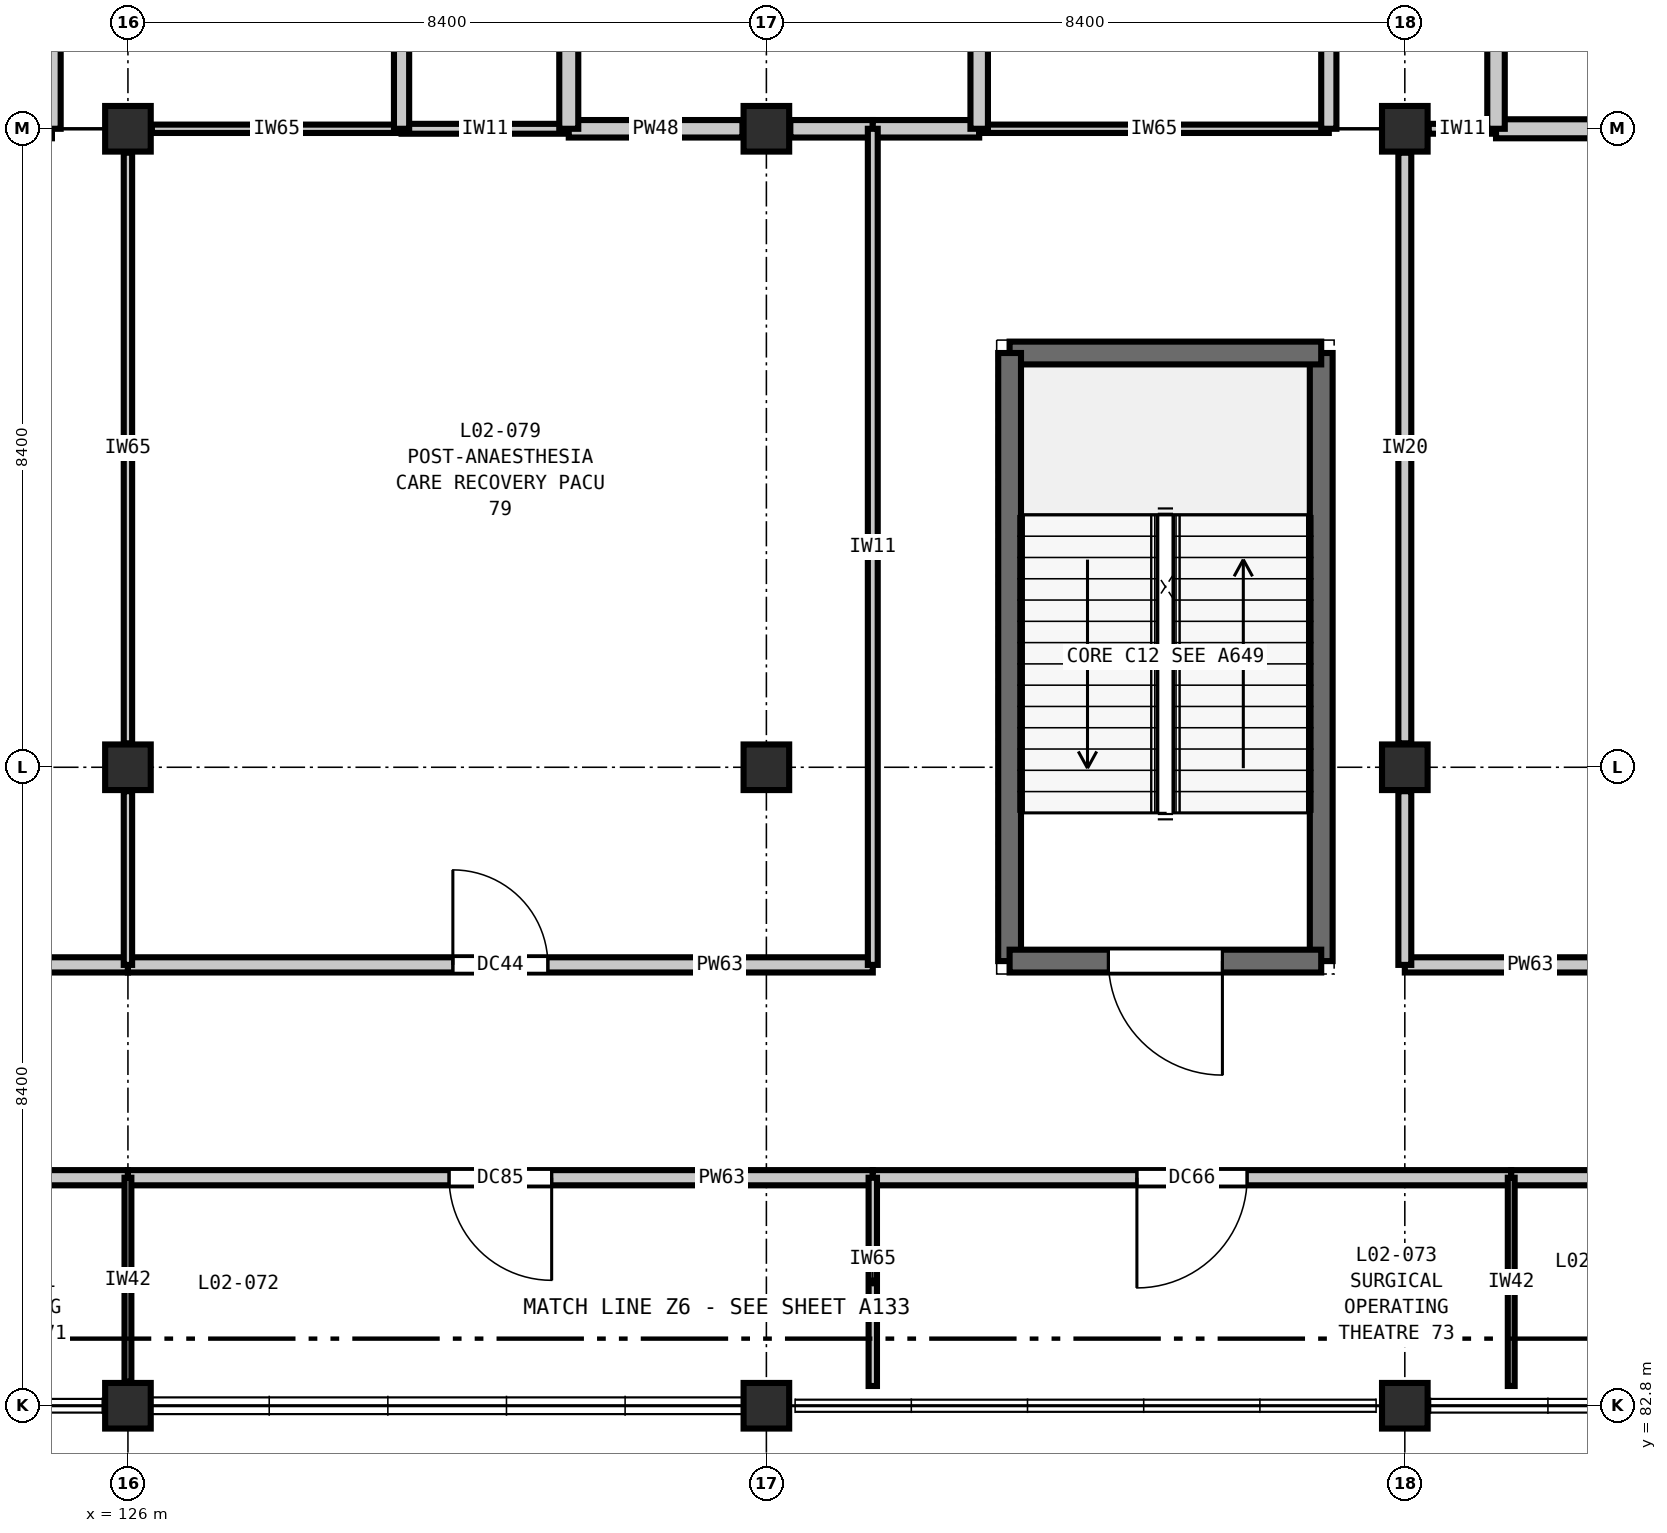
"""IFC4 building model, lengths in metres.
Left out: names, types, materials, properties, quantities, classifications, styles, units other than length and angle.
Written with IfcOpenShell. Run it as: python <this file> out.ifc"""

import sys

from ifc_helpers import new_model, si_unit, direction, frame, frame_2d, origin, origin_2d, place, context, subcontext, project, spatial, rectangle, extrude, element, fill, save


model = new_model("IFC4")
c1 = context("Model", 3, precision=1e-05, world=origin(), true_north=direction((0.0, 1.0)))
c2 = subcontext(c1, "Body", "Model", "MODEL_VIEW")
j1 = project(units=[si_unit("LENGTHUNIT", "METRE"), si_unit("PLANEANGLEUNIT", "RADIAN")], contexts=[c1])
p1 = place(None, origin())
s1 = spatial("IfcSite", under=j1, at=p1, CompositionType="ELEMENT")
p2 = place(p1, origin())
s2 = spatial("IfcBuilding", under=s1, at=p2, CompositionType="ELEMENT")
p3 = place(p2, frame((0.0, 0.0, 10.8)))
s3 = spatial("IfcBuildingStorey", under=s2, at=p3, CompositionType="ELEMENT", Elevation=10.8)
for number, where, z_axis, x_axis in (
    (1, (126.0, 82.8, 0.0), (0.0, 0.0, 1.0), (1.0, 0.0, 0.0)),
    (2, (126.0, 91.2, 0.0), (0.0, 0.0, 1.0), (1.0, 0.0, 0.0)),
    (3, (126.0, 99.6, 0.0), (0.0, 0.0, 1.0), (1.0, 0.0, 0.0)),
    (4, (134.4, 82.8, 0.0), (0.0, 0.0, 1.0), (1.0, 0.0, 0.0)),
    (5, (134.4, 91.2, 0.0), (0.0, 0.0, 1.0), (1.0, 0.0, 0.0)),
    (6, (134.4, 99.6, 0.0), (0.0, 0.0, 1.0), (1.0, 0.0, 0.0)),
    (7, (142.8, 82.8, 0.0), (0.0, 0.0, 1.0), (1.0, 0.0, 0.0)),
    (8, (142.8, 91.2, 0.0), (0.0, 0.0, 1.0), (1.0, 0.0, 0.0)),
    (9, (142.8, 99.6, 0.0), (0.0, 0.0, 1.0), (1.0, 0.0, 0.0)),
):
    element("IfcColumn", number, at=place(p3, frame(where, z_axis=z_axis, x_axis=x_axis)), inside=s3, PredefinedType="COLUMN", context=c2, shape_type="SweptSolid", body=[
        extrude(rectangle(XDim=0.6, YDim=0.6, at=origin_2d()), origin(), (0.0, 0.0, 1.0), 5.4),
    ])
p4 = place(p3, frame((141.7, 88.65, 0.0), z_axis=(0.0, 0.0, 1.0), x_axis=(0.0, 1.0, 0.0)))
e10 = element("IfcWall", 10, at=p4, inside=s3, PredefinedType="SHEAR", context=c2, shape_type="SweptSolid", body=[
    extrude(rectangle(XDim=8.0, YDim=0.3, at=frame_2d((4.0, 0.0))), origin(), (0.0, 0.0, 1.0), 5.4),
])
p5 = place(p3, frame((141.7, 96.65, 0.0), z_axis=(0.0, 0.0, 1.0), x_axis=(-1.0, 0.0, 0.0)))
e11 = element("IfcWall", 11, at=p5, inside=s3, PredefinedType="SHEAR", context=c2, shape_type="SweptSolid", body=[
    extrude(rectangle(XDim=4.1, YDim=0.3, at=frame_2d((2.05, 0.0))), origin(), (0.0, 0.0, 1.0), 5.4),
])
p6 = place(p3, frame((137.6, 96.65, 0.0), z_axis=(0.0, 0.0, 1.0), x_axis=(0.0, -1.0, 0.0)))
e12 = element("IfcWall", 12, at=p6, inside=s3, PredefinedType="SHEAR", context=c2, shape_type="SweptSolid", body=[
    extrude(rectangle(XDim=8.0, YDim=0.3, at=frame_2d((4.0, 0.0))), origin(), (0.0, 0.0, 1.0), 5.4),
])
p7 = place(p3, frame((137.6, 88.65, 0.0), z_axis=(0.0, 0.0, 1.0), x_axis=(1.0, 0.0, 0.0)))
e13 = element("IfcWall", 13, at=p7, inside=s3, PredefinedType="SHEAR", context=c2, shape_type="SweptSolid", body=[
    extrude(rectangle(XDim=4.1, YDim=0.3, at=frame_2d((2.05, 0.0))), origin(), (0.0, 0.0, 1.0), 5.4),
])
p8 = place(p7, frame((1.3, 0.0, 0.0)))
e14 = element("IfcOpeningElement", 14, at=p8, cuts=e13, PredefinedType="OPENING", context=c2, shape_type="SweptSolid", body=[
    extrude(rectangle(XDim=1.5, YDim=2.2, at=frame_2d((0.75, 1.1))), frame((0.0, 0.16, 0.0), z_axis=(0.0, -1.0, 0.0), x_axis=(1.0, 0.0, 0.0)), (0.0, 0.0, 1.0), 0.32),
])
p9 = place(p3, frame((117.6, 85.8, 0.0), z_axis=(0.0, 0.0, 1.0), x_axis=(1.0, 0.0, 0.0)))
e15 = element("IfcWall", 15, at=p9, inside=s3, PredefinedType="PARTITIONING", context=c2, shape_type="SweptSolid", body=[
    extrude(rectangle(XDim=8.4, YDim=0.2, at=frame_2d((4.2, 0.0))), origin(), (0.0, 0.0, 1.0), 5.07),
])
p10 = place(p9, frame((3.55, 0.0, 0.0)))
e16 = element("IfcOpeningElement", 16, at=p10, cuts=e15, PredefinedType="OPENING", context=c2, shape_type="SweptSolid", body=[
    extrude(rectangle(XDim=1.3, YDim=2.2, at=frame_2d((0.65, 1.1))), frame((0.0, 0.11, 0.0), z_axis=(0.0, -1.0, 0.0), x_axis=(1.0, 0.0, 0.0)), (0.0, 0.0, 1.0), 0.22),
])
p11 = place(p3, frame((126.0, 85.8, 0.0), z_axis=(0.0, 0.0, 1.0), x_axis=(1.0, 0.0, 0.0)))
e17 = element("IfcWall", 17, at=p11, inside=s3, PredefinedType="PARTITIONING", context=c2, shape_type="SweptSolid", body=[
    extrude(rectangle(XDim=9.8, YDim=0.2, at=frame_2d((4.9, 0.0))), origin(), (0.0, 0.0, 1.0), 5.07),
])
p12 = place(p11, frame((4.225, 0.0, 0.0)))
e18 = element("IfcOpeningElement", 18, at=p12, cuts=e17, PredefinedType="OPENING", context=c2, shape_type="SweptSolid", body=[
    extrude(rectangle(XDim=1.35, YDim=2.2, at=frame_2d((0.675, 1.1))), frame((0.0, 0.11, 0.0), z_axis=(0.0, -1.0, 0.0), x_axis=(1.0, 0.0, 0.0)), (0.0, 0.0, 1.0), 0.22),
])
p13 = place(p3, frame((135.8, 85.8, 0.0), z_axis=(0.0, 0.0, 1.0), x_axis=(1.0, 0.0, 0.0)))
e19 = element("IfcWall", 19, at=p13, inside=s3, PredefinedType="PARTITIONING", context=c2, shape_type="SweptSolid", body=[
    extrude(rectangle(XDim=8.4, YDim=0.2, at=frame_2d((4.2, 0.0))), origin(), (0.0, 0.0, 1.0), 5.07),
])
p14 = place(p13, frame((3.475, 0.0, 0.0)))
e20 = element("IfcOpeningElement", 20, at=p14, cuts=e19, PredefinedType="OPENING", context=c2, shape_type="SweptSolid", body=[
    extrude(rectangle(XDim=1.45, YDim=2.25, at=frame_2d((0.725, 1.125))), frame((0.0, 0.11, 0.0), z_axis=(0.0, -1.0, 0.0), x_axis=(1.0, 0.0, 0.0)), (0.0, 0.0, 1.0), 0.22),
])
p15 = place(p3, frame((144.2, 85.8, 0.0), z_axis=(0.0, 0.0, 1.0), x_axis=(1.0, 0.0, 0.0)))
e21 = element("IfcWall", 21, at=p15, inside=s3, PredefinedType="PARTITIONING", context=c2, shape_type="SweptSolid", body=[
    extrude(rectangle(XDim=7.0, YDim=0.2, at=frame_2d((3.5, 0.0))), origin(), (0.0, 0.0, 1.0), 5.07),
])
p16 = place(p15, frame((2.725, 0.0, 0.0)))
e22 = element("IfcOpeningElement", 22, at=p16, cuts=e21, PredefinedType="OPENING", context=c2, shape_type="SweptSolid", body=[
    extrude(rectangle(XDim=1.55, YDim=2.25, at=frame_2d((0.775, 1.125))), frame((0.0, 0.11, 0.0), z_axis=(0.0, -1.0, 0.0), x_axis=(1.0, 0.0, 0.0)), (0.0, 0.0, 1.0), 0.22),
])
p17 = place(p3, frame((117.6, 88.6, 0.0), z_axis=(0.0, 0.0, 1.0), x_axis=(1.0, 0.0, 0.0)))
e23 = element("IfcWall", 23, at=p17, inside=s3, PredefinedType="PARTITIONING", context=c2, shape_type="SweptSolid", body=[
    extrude(rectangle(XDim=8.4, YDim=0.2, at=frame_2d((4.2, 0.0))), origin(), (0.0, 0.0, 1.0), 5.07),
])
p18 = place(p17, frame((3.275, 0.0, 0.0)))
e24 = element("IfcOpeningElement", 24, at=p18, cuts=e23, PredefinedType="OPENING", context=c2, shape_type="SweptSolid", body=[
    extrude(rectangle(XDim=1.85, YDim=2.3, at=frame_2d((0.925, 1.15))), frame((0.0, 0.11, 0.0), z_axis=(0.0, -1.0, 0.0), x_axis=(1.0, 0.0, 0.0)), (0.0, 0.0, 1.0), 0.22),
])
p19 = place(p3, frame((126.0, 88.6, 0.0), z_axis=(0.0, 0.0, 1.0), x_axis=(1.0, 0.0, 0.0)))
e25 = element("IfcWall", 25, at=p19, inside=s3, PredefinedType="PARTITIONING", context=c2, shape_type="SweptSolid", body=[
    extrude(rectangle(XDim=9.8, YDim=0.2, at=frame_2d((4.9, 0.0))), origin(), (0.0, 0.0, 1.0), 5.07),
])
p20 = place(p19, frame((4.275, 0.0, 0.0)))
e26 = element("IfcOpeningElement", 26, at=p20, cuts=e25, PredefinedType="OPENING", context=c2, shape_type="SweptSolid", body=[
    extrude(rectangle(XDim=1.25, YDim=2.15, at=frame_2d((0.625, 1.075))), frame((0.0, 0.11, 0.0), z_axis=(0.0, -1.0, 0.0), x_axis=(1.0, 0.0, 0.0)), (0.0, 0.0, 1.0), 0.22),
])
p21 = place(p3, frame((142.8, 88.6, 0.0), z_axis=(0.0, 0.0, 1.0), x_axis=(1.0, 0.0, 0.0)))
e27 = element("IfcWall", 27, at=p21, inside=s3, PredefinedType="PARTITIONING", context=c2, shape_type="SweptSolid", body=[
    extrude(rectangle(XDim=8.4, YDim=0.2, at=frame_2d((4.2, 0.0))), origin(), (0.0, 0.0, 1.0), 5.07),
])
p22 = place(p21, frame((3.55, 0.0, 0.0)))
e28 = element("IfcOpeningElement", 28, at=p22, cuts=e27, PredefinedType="OPENING", context=c2, shape_type="SweptSolid", body=[
    extrude(rectangle(XDim=1.3, YDim=2.2, at=frame_2d((0.65, 1.1))), frame((0.0, 0.11, 0.0), z_axis=(0.0, -1.0, 0.0), x_axis=(1.0, 0.0, 0.0)), (0.0, 0.0, 1.0), 0.22),
])
p23 = place(p3, frame((126.315, 99.6, 0.0), z_axis=(0.0, 0.0, 1.0), x_axis=(1.0, 0.0, 0.0)))
e29 = element("IfcWall", 29, at=p23, inside=s3, PredefinedType="PARTITIONING", context=c2, shape_type="SweptSolid", body=[
    extrude(rectangle(XDim=3.285, YDim=0.11, at=frame_2d((1.643, 0.0))), origin(), (0.0, 0.0, 1.0), 4.735),
])
p24 = place(p3, frame((129.6, 99.6, 0.0), z_axis=(0.0, 0.0, 1.0), x_axis=(1.0, 0.0, 0.0)))
e30 = element("IfcWall", 30, at=p24, inside=s3, PredefinedType="PARTITIONING", context=c2, shape_type="SweptSolid", body=[
    extrude(rectangle(XDim=2.2, YDim=0.13, at=frame_2d((1.1, 0.0))), origin(), (0.0, 0.0, 1.0), 4.735),
])
p25 = place(p3, frame((131.8, 99.6, 0.0), z_axis=(0.0, 0.0, 1.0), x_axis=(1.0, 0.0, 0.0)))
e31 = element("IfcWall", 31, at=p25, inside=s3, PredefinedType="PARTITIONING", context=c2, shape_type="SweptSolid", body=[
    extrude(rectangle(XDim=2.285, YDim=0.23, at=frame_2d((1.143, 0.0))), origin(), (0.0, 0.0, 1.0), 4.735),
])
p26 = place(p3, frame((134.715, 99.6, 0.0), z_axis=(0.0, 0.0, 1.0), x_axis=(1.0, 0.0, 0.0)))
e32 = element("IfcWall", 32, at=p26, inside=s3, PredefinedType="PARTITIONING", context=c2, shape_type="SweptSolid", body=[
    extrude(rectangle(XDim=1.085, YDim=0.23, at=frame_2d((0.542, 0.0))), origin(), (0.0, 0.0, 1.0), 4.735),
])
p27 = place(p3, frame((135.8, 99.6, 0.0), z_axis=(0.0, 0.0, 1.0), x_axis=(1.0, 0.0, 0.0)))
e33 = element("IfcWall", 33, at=p27, inside=s3, PredefinedType="PARTITIONING", context=c2, shape_type="SweptSolid", body=[
    extrude(rectangle(XDim=1.4, YDim=0.23, at=frame_2d((0.7, 0.0))), origin(), (0.0, 0.0, 1.0), 4.735),
])
p28 = place(p3, frame((137.2, 99.6, 0.0), z_axis=(0.0, 0.0, 1.0), x_axis=(1.0, 0.0, 0.0)))
e34 = element("IfcWall", 34, at=p28, inside=s3, PredefinedType="PARTITIONING", context=c2, shape_type="SweptSolid", body=[
    extrude(rectangle(XDim=4.6, YDim=0.11, at=frame_2d((2.3, 0.0))), origin(), (0.0, 0.0, 1.0), 4.735),
])
p29 = place(p3, frame((143.115, 99.6, 0.0), z_axis=(0.0, 0.0, 1.0), x_axis=(1.0, 0.0, 0.0)))
e35 = element("IfcWall", 35, at=p29, inside=s3, PredefinedType="PARTITIONING", context=c2, shape_type="SweptSolid", body=[
    extrude(rectangle(XDim=0.885, YDim=0.13, at=frame_2d((0.442, 0.0))), origin(), (0.0, 0.0, 1.0), 4.735),
])
p30 = place(p3, frame((144.0, 99.6, 0.0), z_axis=(0.0, 0.0, 1.0), x_axis=(1.0, 0.0, 0.0)))
e36 = element("IfcWall", 36, at=p30, inside=s3, PredefinedType="PARTITIONING", context=c2, shape_type="SweptSolid", body=[
    extrude(rectangle(XDim=5.4, YDim=0.25, at=frame_2d((2.7, 0.0))), origin(), (0.0, 0.0, 1.0), 4.735),
])
p31 = place(p3, frame((125.0, 99.6, 0.0), z_axis=(0.0, 0.0, 1.0), x_axis=(0.0, 1.0, 0.0)))
e37 = element("IfcWall", 37, at=p31, inside=s3, PredefinedType="PARTITIONING", context=c2, shape_type="SweptSolid", body=[
    extrude(rectangle(XDim=13.6, YDim=0.23, at=frame_2d((6.8, 0.0))), origin(), (0.0, 0.0, 1.0), 5.07),
])
p32 = place(p3, frame((126.0, 83.115, 0.0), z_axis=(0.0, 0.0, 1.0), x_axis=(0.0, 1.0, 0.0)))
e38 = element("IfcWall", 38, at=p32, inside=s3, PredefinedType="PARTITIONING", context=c2, shape_type="SweptSolid", body=[
    extrude(rectangle(XDim=2.685, YDim=0.09, at=frame_2d((1.343, 0.0))), origin(), (0.0, 0.0, 1.0), 4.735),
])
p33 = place(p3, frame((126.0, 91.515, 0.0), z_axis=(0.0, 0.0, 1.0), x_axis=(0.0, 1.0, 0.0)))
e39 = element("IfcWall", 39, at=p33, inside=s3, PredefinedType="PARTITIONING", context=c2, shape_type="SweptSolid", body=[
    extrude(rectangle(XDim=7.77, YDim=0.11, at=frame_2d((3.885, 0.0))), origin(), (0.0, 0.0, 1.0), 4.735),
])
p34 = place(p3, frame((126.0, 88.6, 0.0), z_axis=(0.0, 0.0, 1.0), x_axis=(0.0, 1.0, 0.0)))
e40 = element("IfcWall", 40, at=p34, inside=s3, PredefinedType="PARTITIONING", context=c2, shape_type="SweptSolid", body=[
    extrude(rectangle(XDim=2.285, YDim=0.11, at=frame_2d((1.143, 0.0))), origin(), (0.0, 0.0, 1.0), 4.735),
])
p35 = place(p3, frame((129.6, 99.6, 0.0), z_axis=(0.0, 0.0, 1.0), x_axis=(0.0, 1.0, 0.0)))
e41 = element("IfcWall", 41, at=p35, inside=s3, PredefinedType="PARTITIONING", context=c2, shape_type="SweptSolid", body=[
    extrude(rectangle(XDim=6.8, YDim=0.2, at=frame_2d((3.4, 0.0))), origin(), (0.0, 0.0, 1.0), 5.07),
])
p36 = place(p35, frame((2.675, 0.0, 0.0)))
e42 = element("IfcOpeningElement", 42, at=p36, cuts=e41, PredefinedType="OPENING", context=c2, shape_type="SweptSolid", body=[
    extrude(rectangle(XDim=1.45, YDim=2.25, at=frame_2d((0.725, 1.125))), frame((0.0, 0.11, 0.0), z_axis=(0.0, -1.0, 0.0), x_axis=(1.0, 0.0, 0.0)), (0.0, 0.0, 1.0), 0.22),
])
p37 = place(p3, frame((131.8, 99.6, 0.0), z_axis=(0.0, 0.0, 1.0), x_axis=(0.0, 1.0, 0.0)))
e43 = element("IfcWall", 43, at=p37, inside=s3, PredefinedType="PARTITIONING", context=c2, shape_type="SweptSolid", body=[
    extrude(rectangle(XDim=6.8, YDim=0.25, at=frame_2d((3.4, 0.0))), origin(), (0.0, 0.0, 1.0), 5.07),
])
p38 = place(p3, frame((135.8, 83.06, 0.0), z_axis=(0.0, 0.0, 1.0), x_axis=(0.0, 1.0, 0.0)))
e44 = element("IfcWall", 44, at=p38, inside=s3, PredefinedType="PARTITIONING", context=c2, shape_type="SweptSolid", body=[
    extrude(rectangle(XDim=2.74, YDim=0.11, at=frame_2d((1.37, 0.0))), origin(), (0.0, 0.0, 1.0), 5.07),
])
p39 = place(p3, frame((135.8, 88.6, 0.0), z_axis=(0.0, 0.0, 1.0), x_axis=(0.0, 1.0, 0.0)))
e45 = element("IfcWall", 45, at=p39, inside=s3, PredefinedType="PARTITIONING", context=c2, shape_type="SweptSolid", body=[
    extrude(rectangle(XDim=11.0, YDim=0.13, at=frame_2d((5.5, 0.0))), origin(), (0.0, 0.0, 1.0), 5.07),
])
p40 = place(p3, frame((137.2, 99.6, 0.0), z_axis=(0.0, 0.0, 1.0), x_axis=(0.0, 1.0, 0.0)))
e46 = element("IfcWall", 46, at=p40, inside=s3, PredefinedType="PARTITIONING", context=c2, shape_type="SweptSolid", body=[
    extrude(rectangle(XDim=13.6, YDim=0.23, at=frame_2d((6.8, 0.0))), origin(), (0.0, 0.0, 1.0), 5.07),
])
p41 = place(p3, frame((141.8, 99.6, 0.0), z_axis=(0.0, 0.0, 1.0), x_axis=(0.0, 1.0, 0.0)))
e47 = element("IfcWall", 47, at=p41, inside=s3, PredefinedType="PARTITIONING", context=c2, shape_type="SweptSolid", body=[
    extrude(rectangle(XDim=6.8, YDim=0.2, at=frame_2d((3.4, 0.0))), origin(), (0.0, 0.0, 1.0), 5.07),
])
p42 = place(p41, frame((3.936, 0.0, 0.0)))
e48 = element("IfcOpeningElement", 48, at=p42, cuts=e47, PredefinedType="OPENING", context=c2, shape_type="SweptSolid", body=[
    extrude(rectangle(XDim=1.7, YDim=2.3, at=frame_2d((0.85, 1.15))), frame((0.0, 0.11, 0.0), z_axis=(0.0, -1.0, 0.0), x_axis=(1.0, 0.0, 0.0)), (0.0, 0.0, 1.0), 0.22),
])
p43 = place(p3, frame((142.8, 91.515, 0.0), z_axis=(0.0, 0.0, 1.0), x_axis=(0.0, 1.0, 0.0)))
e49 = element("IfcWall", 49, at=p43, inside=s3, PredefinedType="PARTITIONING", context=c2, shape_type="SweptSolid", body=[
    extrude(rectangle(XDim=7.77, YDim=0.17, at=frame_2d((3.885, 0.0))), origin(), (0.0, 0.0, 1.0), 4.735),
])
p44 = place(p3, frame((142.8, 88.6, 0.0), z_axis=(0.0, 0.0, 1.0), x_axis=(0.0, 1.0, 0.0)))
e50 = element("IfcWall", 50, at=p44, inside=s3, PredefinedType="PARTITIONING", context=c2, shape_type="SweptSolid", body=[
    extrude(rectangle(XDim=2.285, YDim=0.17, at=frame_2d((1.143, 0.0))), origin(), (0.0, 0.0, 1.0), 4.735),
])
p45 = place(p3, frame((144.0, 99.6, 0.0), z_axis=(0.0, 0.0, 1.0), x_axis=(0.0, 1.0, 0.0)))
e51 = element("IfcWall", 51, at=p45, inside=s3, PredefinedType="PARTITIONING", context=c2, shape_type="SweptSolid", body=[
    extrude(rectangle(XDim=6.8, YDim=0.23, at=frame_2d((3.4, 0.0))), origin(), (0.0, 0.0, 1.0), 5.07),
])
p46 = place(p3, frame((144.2, 83.06, 0.0), z_axis=(0.0, 0.0, 1.0), x_axis=(0.0, 1.0, 0.0)))
e52 = element("IfcWall", 52, at=p46, inside=s3, PredefinedType="PARTITIONING", context=c2, shape_type="SweptSolid", body=[
    extrude(rectangle(XDim=2.74, YDim=0.09, at=frame_2d((1.37, 0.0))), origin(), (0.0, 0.0, 1.0), 5.07),
])
p47 = place(p8, frame((1.5, 0.0, 0.0), z_axis=(0.0, 0.0, 1.0), x_axis=(-1.0, 0.0, 0.0)))
e53 = element("IfcDoor", 53, at=p47, inside=s3, OperationType="SINGLE_SWING_LEFT", PredefinedType="DOOR", context=c2, shape_type="SweptSolid", body=[
    extrude(rectangle(XDim=1.5, YDim=2.2, at=frame_2d((0.75, 1.1))), frame((0.0, 0.025, 0.0), z_axis=(0.0, -1.0, 0.0), x_axis=(1.0, 0.0, 0.0)), (0.0, 0.0, 1.0), 0.05),
])
fill(e14, e53)
p48 = place(p12, frame((1.35, 0.0, 0.0), z_axis=(0.0, 0.0, 1.0), x_axis=(-1.0, 0.0, 0.0)))
e54 = element("IfcDoor", 54, at=p48, inside=s3, OperationType="SINGLE_SWING_LEFT", PredefinedType="DOOR", context=c2, shape_type="SweptSolid", body=[
    extrude(rectangle(XDim=1.35, YDim=2.2, at=frame_2d((0.675, 1.1))), frame((0.0, 0.025, 0.0), z_axis=(0.0, -1.0, 0.0), x_axis=(1.0, 0.0, 0.0)), (0.0, 0.0, 1.0), 0.05),
])
fill(e18, e54)
p49 = place(p14, frame((1.45, 0.0, 0.0), z_axis=(0.0, 0.0, 1.0), x_axis=(-1.0, 0.0, 0.0)))
e55 = element("IfcDoor", 55, at=p49, inside=s3, OperationType="SINGLE_SWING_RIGHT", PredefinedType="DOOR", context=c2, shape_type="SweptSolid", body=[
    extrude(rectangle(XDim=1.45, YDim=2.25, at=frame_2d((0.725, 1.125))), frame((0.0, 0.025, 0.0), z_axis=(0.0, -1.0, 0.0), x_axis=(1.0, 0.0, 0.0)), (0.0, 0.0, 1.0), 0.05),
])
fill(e20, e55)
p50 = place(p20, origin())
e56 = element("IfcDoor", 56, at=p50, inside=s3, OperationType="SINGLE_SWING_LEFT", PredefinedType="DOOR", context=c2, shape_type="SweptSolid", body=[
    extrude(rectangle(XDim=1.25, YDim=2.15, at=frame_2d((0.625, 1.075))), frame((0.0, 0.025, 0.0), z_axis=(0.0, -1.0, 0.0), x_axis=(1.0, 0.0, 0.0)), (0.0, 0.0, 1.0), 0.05),
])
fill(e26, e56)
save(model, sys.argv[1])
